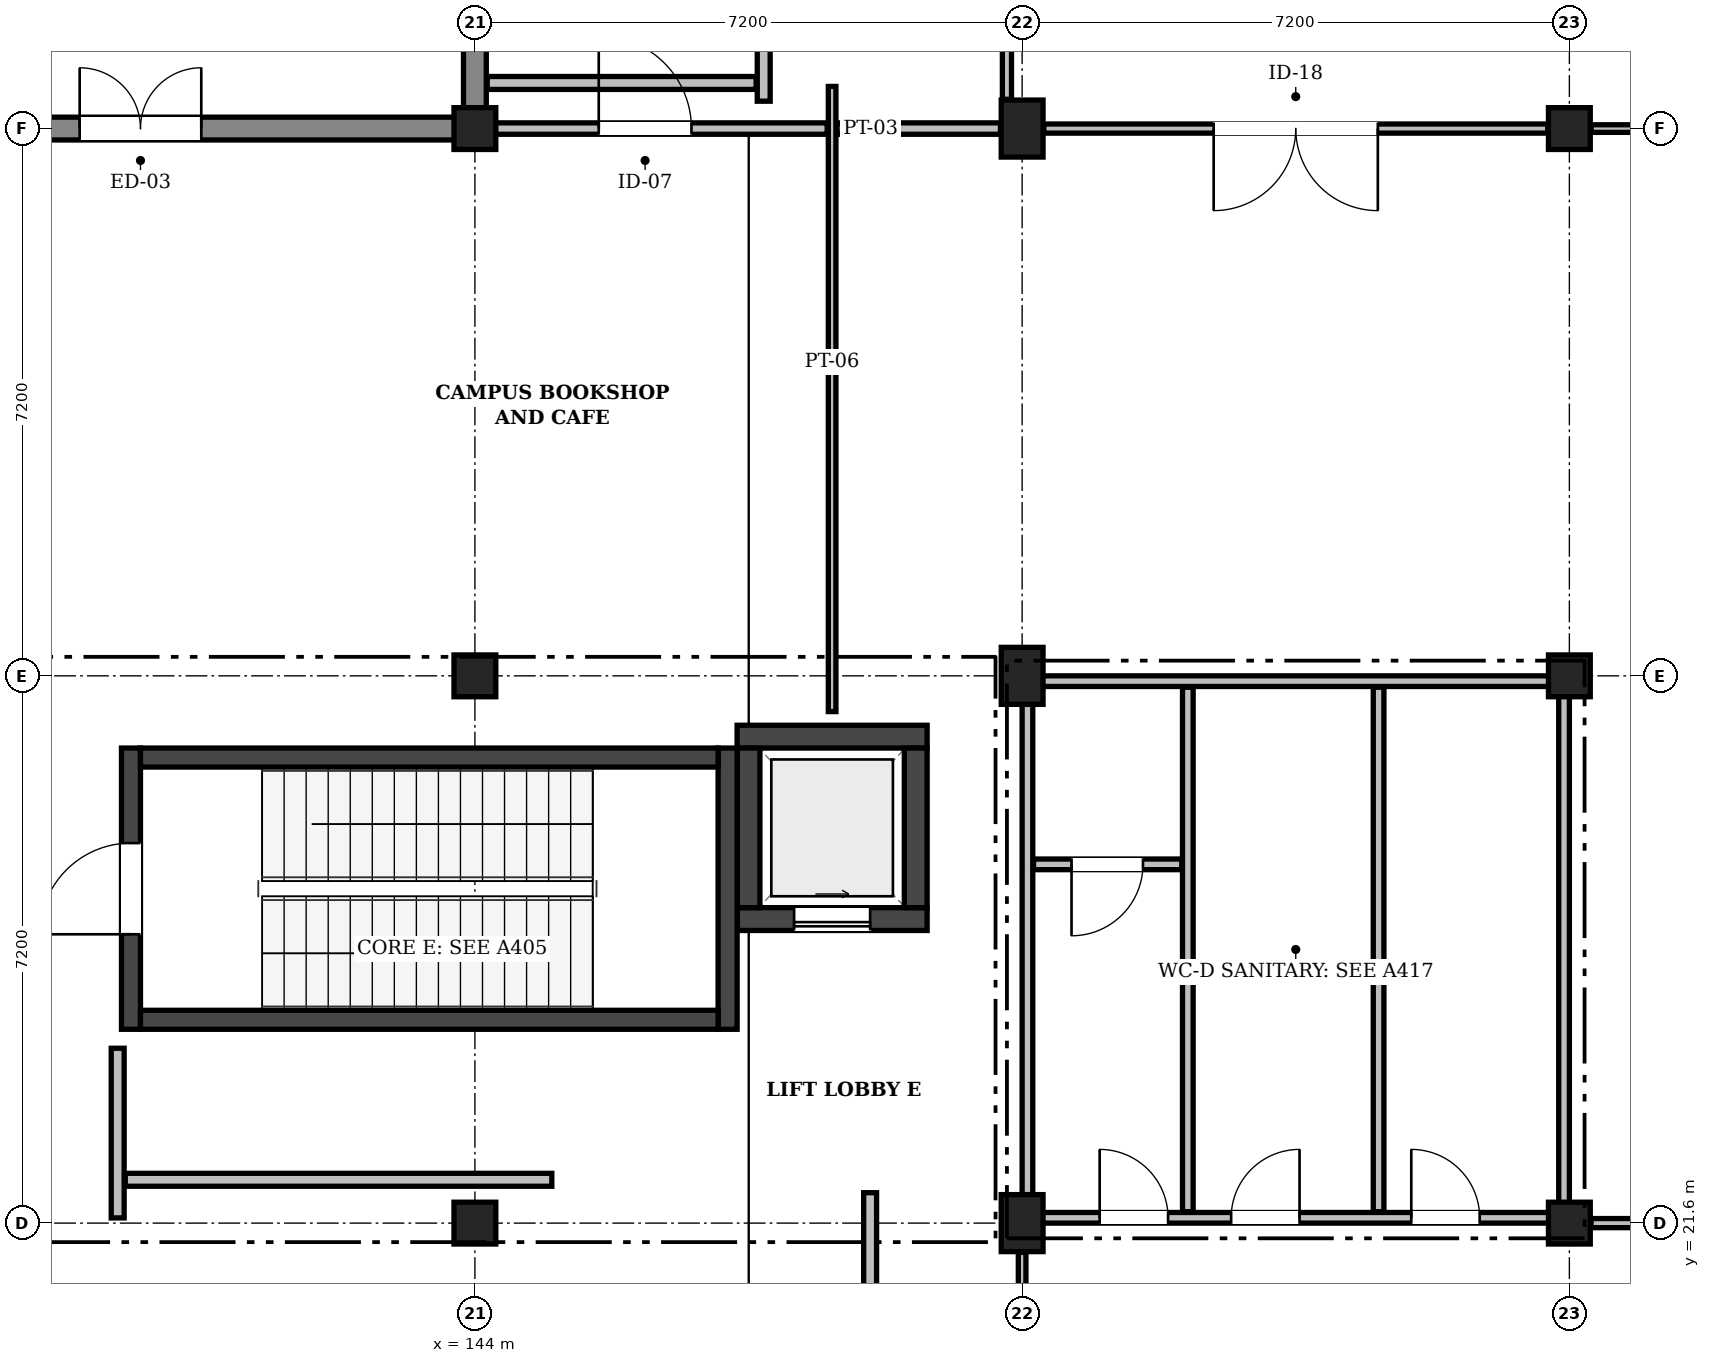
"""IFC4 building model, lengths in metres.
Left out: names, types, materials, properties, quantities, classifications, styles, units other than length and angle.
Written with IfcOpenShell. Run it as: python <this file> out.ifc"""

import sys

from ifc_helpers import new_model, si_unit, direction, frame, frame_2d, origin, origin_2d, place, context, subcontext, project, spatial, rectangle, extrude, element, fill, save


model = new_model("IFC4")
c1 = context("Model", 3, precision=1e-05, world=origin(), true_north=direction((0.0, 1.0)))
c2 = subcontext(c1, "Body", "Model", "MODEL_VIEW")
j1 = project(units=[si_unit("LENGTHUNIT", "METRE"), si_unit("PLANEANGLEUNIT", "RADIAN")], contexts=[c1])
p1 = place(None, origin())
s1 = spatial("IfcSite", under=j1, at=p1, CompositionType="ELEMENT")
p2 = place(p1, origin())
s2 = spatial("IfcBuilding", under=s1, at=p2, CompositionType="ELEMENT")
p3 = place(p2, origin())
s3 = spatial("IfcBuildingStorey", under=s2, at=p3, CompositionType="ELEMENT", Elevation=0.0)
for number, where, z_axis, x_axis in (
    (1, (144.0, 21.6, 0.0), (0.0, 0.0, 1.0), (1.0, 0.0, 0.0)),
    (2, (144.0, 28.8, 0.0), (0.0, 0.0, 1.0), (1.0, 0.0, 0.0)),
    (3, (144.0, 36.0, 0.0), (0.0, 0.0, 1.0), (1.0, 0.0, 0.0)),
):
    element("IfcColumn", number, at=place(p3, frame(where, z_axis=z_axis, x_axis=x_axis)), inside=s3, PredefinedType="COLUMN", context=c2, shape_type="SweptSolid", body=[
        extrude(rectangle(XDim=0.55, YDim=0.55, at=origin_2d()), origin(), (0.0, 0.0, 1.0), 4.8),
    ])
for number, where, z_axis, x_axis in (
    (4, (151.2, 21.6, 0.0), (0.0, 0.0, 1.0), (1.0, 0.0, 0.0)),
    (5, (151.2, 28.8, 0.0), (0.0, 0.0, 1.0), (1.0, 0.0, 0.0)),
    (6, (151.2, 36.0, 0.0), (0.0, 0.0, 1.0), (1.0, 0.0, 0.0)),
):
    element("IfcColumn", number, at=place(p3, frame(where, z_axis=z_axis, x_axis=x_axis)), inside=s3, PredefinedType="COLUMN", context=c2, shape_type="SweptSolid", body=[
        extrude(rectangle(XDim=0.55, YDim=0.75, at=origin_2d()), origin(), (0.0, 0.0, 1.0), 4.8),
    ])
for number, where, z_axis, x_axis in (
    (7, (158.4, 21.6, 0.0), (0.0, 0.0, 1.0), (1.0, 0.0, 0.0)),
    (8, (158.4, 28.8, 0.0), (0.0, 0.0, 1.0), (1.0, 0.0, 0.0)),
    (9, (158.4, 36.0, 0.0), (0.0, 0.0, 1.0), (1.0, 0.0, 0.0)),
):
    element("IfcColumn", number, at=place(p3, frame(where, z_axis=z_axis, x_axis=x_axis)), inside=s3, PredefinedType="COLUMN", context=c2, shape_type="SweptSolid", body=[
        extrude(rectangle(XDim=0.55, YDim=0.55, at=origin_2d()), origin(), (0.0, 0.0, 1.0), 4.8),
    ])
p4 = place(p3, frame((136.8, 36.0, 0.0), z_axis=(0.0, 0.0, 1.0), x_axis=(1.0, 0.0, 0.0)))
e10 = element("IfcWall", 10, at=p4, inside=s3, PredefinedType="SOLIDWALL", context=c2, shape_type="SweptSolid", body=[
    extrude(rectangle(XDim=7.35, YDim=0.3, at=frame_2d((3.675, 0.0))), origin(), (0.0, 0.0, 1.0), 4.52),
])
p5 = place(p4, frame((2.0, 0.0, 0.0)))
e11 = element("IfcOpeningElement", 11, at=p5, cuts=e10, PredefinedType="OPENING", context=c2, shape_type="SweptSolid", body=[
    extrude(rectangle(XDim=1.6, YDim=2.2, at=frame_2d((0.8, 1.1))), frame((0.0, 0.162, 0.0), z_axis=(0.0, -1.0, 0.0), x_axis=(1.0, 0.0, 0.0)), (0.0, 0.0, 1.0), 0.324),
])
p6 = place(p3, frame((144.0, 36.152, 0.0), z_axis=(0.0, 0.0, 1.0), x_axis=(0.0, 1.0, 0.0)))
e12 = element("IfcWall", 12, at=p6, inside=s3, PredefinedType="SOLIDWALL", context=c2, shape_type="SweptSolid", body=[
    extrude(rectangle(XDim=7.048, YDim=0.3, at=frame_2d((3.524, 0.0))), origin(), (0.0, 0.0, 1.0), 4.52),
])
p7 = place(p6, frame((2.888, 0.0, 0.95)))
e13 = element("IfcOpeningElement", 13, at=p7, cuts=e12, PredefinedType="OPENING", context=c2, shape_type="SweptSolid", body=[
    extrude(rectangle(XDim=1.7, YDim=1.55, at=frame_2d((0.85, 0.775))), frame((0.0, 0.162, 0.0), z_axis=(0.0, -1.0, 0.0), x_axis=(1.0, 0.0, 0.0)), (0.0, 0.0, 1.0), 0.324),
])
p8 = place(p3, frame((147.45, 25.6, 0.0), z_axis=(0.0, 0.0, 1.0), x_axis=(1.0, 0.0, 0.0)))
e14 = element("IfcWall", 14, at=p8, inside=s3, PredefinedType="SHEAR", context=c2, shape_type="SweptSolid", body=[
    extrude(rectangle(XDim=2.5, YDim=0.3, at=frame_2d((1.25, 0.0))), origin(), (0.0, 0.0, 1.0), 4.55),
])
p9 = place(p8, frame((0.75, 0.0, 0.0)))
e15 = element("IfcOpeningElement", 15, at=p9, cuts=e14, PredefinedType="OPENING", context=c2, shape_type="SweptSolid", body=[
    extrude(rectangle(XDim=1.0, YDim=2.1, at=frame_2d((0.5, 1.05))), frame((0.0, 0.162, 0.0), z_axis=(0.0, -1.0, 0.0), x_axis=(1.0, 0.0, 0.0)), (0.0, 0.0, 1.0), 0.324),
])
p10 = place(p3, frame((147.45, 28.0, 0.0), z_axis=(0.0, 0.0, 1.0), x_axis=(1.0, 0.0, 0.0)))
e16 = element("IfcWall", 16, at=p10, inside=s3, PredefinedType="SHEAR", context=c2, shape_type="SweptSolid", body=[
    extrude(rectangle(XDim=2.5, YDim=0.3, at=frame_2d((1.25, 0.0))), origin(), (0.0, 0.0, 1.0), 4.55),
])
for number, where, z_axis, x_axis in (
    (17, (147.6, 25.75, 0.0), (0.0, 0.0, 1.0), (0.0, 1.0, 0.0)),
    (18, (149.8, 25.75, 0.0), (0.0, 0.0, 1.0), (0.0, 1.0, 0.0)),
):
    element("IfcWall", number, at=place(p3, frame(where, z_axis=z_axis, x_axis=x_axis)), inside=s3, PredefinedType="SHEAR", context=c2, shape_type="SweptSolid", body=[
        extrude(rectangle(XDim=2.1, YDim=0.3, at=frame_2d((1.05, 0.0))), origin(), (0.0, 0.0, 1.0), 4.55),
    ])
p11 = place(p3, frame((139.475, 24.15, 0.0), z_axis=(0.0, 0.0, 1.0), x_axis=(0.0, 1.0, 0.0)))
e19 = element("IfcWall", 19, at=p11, inside=s3, PredefinedType="SHEAR", context=c2, shape_type="SweptSolid", body=[
    extrude(rectangle(XDim=3.7, YDim=0.25, at=frame_2d((1.85, 0.0))), origin(), (0.0, 0.0, 1.0), 4.55),
])
p12 = place(p11, frame((1.25, 0.0, 0.0)))
e20 = element("IfcOpeningElement", 20, at=p12, cuts=e19, PredefinedType="OPENING", context=c2, shape_type="SweptSolid", body=[
    extrude(rectangle(XDim=1.2, YDim=2.15, at=frame_2d((0.6, 1.075))), frame((0.0, 0.137, 0.0), z_axis=(0.0, -1.0, 0.0), x_axis=(1.0, 0.0, 0.0)), (0.0, 0.0, 1.0), 0.274),
])
p13 = place(p3, frame((147.325, 24.15, 0.0), z_axis=(0.0, 0.0, 1.0), x_axis=(0.0, 1.0, 0.0)))
e21 = element("IfcWall", 21, at=p13, inside=s3, PredefinedType="SHEAR", context=c2, shape_type="SweptSolid", body=[
    extrude(rectangle(XDim=3.7, YDim=0.25, at=frame_2d((1.85, 0.0))), origin(), (0.0, 0.0, 1.0), 4.55),
])
for number, where, z_axis, x_axis in (
    (22, (139.6, 24.275, 0.0), (0.0, 0.0, 1.0), (1.0, 0.0, 0.0)),
    (23, (139.6, 27.725, 0.0), (0.0, 0.0, 1.0), (1.0, 0.0, 0.0)),
):
    element("IfcWall", number, at=place(p3, frame(where, z_axis=z_axis, x_axis=x_axis)), inside=s3, PredefinedType="SHEAR", context=c2, shape_type="SweptSolid", body=[
        extrude(rectangle(XDim=7.6, YDim=0.25, at=frame_2d((3.8, 0.0))), origin(), (0.0, 0.0, 1.0), 4.55),
    ])
p14 = place(p3, frame((151.27, 21.67, 0.0), z_axis=(0.0, 0.0, 1.0), x_axis=(1.0, 0.0, 0.0)))
e24 = element("IfcWall", 24, at=p14, inside=s3, PredefinedType="PARTITIONING", context=c2, shape_type="SweptSolid", body=[
    extrude(rectangle(XDim=7.06, YDim=0.14, at=frame_2d((3.53, 0.0))), origin(), (0.0, 0.0, 1.0), 3.83),
])
p15 = place(p14, frame((0.95, 0.0, 0.0)))
e25 = element("IfcOpeningElement", 25, at=p15, cuts=e24, PredefinedType="OPENING", context=c2, shape_type="SweptSolid", body=[
    extrude(rectangle(XDim=0.9, YDim=2.08, at=frame_2d((0.45, 1.04))), frame((0.0, 0.082, 0.0), z_axis=(0.0, -1.0, 0.0), x_axis=(1.0, 0.0, 0.0)), (0.0, 0.0, 1.0), 0.164),
])
p16 = place(p14, frame((2.68, 0.0, 0.0)))
e26 = element("IfcOpeningElement", 26, at=p16, cuts=e24, PredefinedType="OPENING", context=c2, shape_type="SweptSolid", body=[
    extrude(rectangle(XDim=0.9, YDim=2.08, at=frame_2d((0.45, 1.04))), frame((0.0, 0.082, 0.0), z_axis=(0.0, -1.0, 0.0), x_axis=(1.0, 0.0, 0.0)), (0.0, 0.0, 1.0), 0.164),
])
p17 = place(p14, frame((5.05, 0.0, 0.0)))
e27 = element("IfcOpeningElement", 27, at=p17, cuts=e24, PredefinedType="OPENING", context=c2, shape_type="SweptSolid", body=[
    extrude(rectangle(XDim=0.9, YDim=2.08, at=frame_2d((0.45, 1.04))), frame((0.0, 0.082, 0.0), z_axis=(0.0, -1.0, 0.0), x_axis=(1.0, 0.0, 0.0)), (0.0, 0.0, 1.0), 0.164),
])
p18 = place(p3, frame((151.27, 28.73, 0.0), z_axis=(0.0, 0.0, 1.0), x_axis=(1.0, 0.0, 0.0)))
e28 = element("IfcWall", 28, at=p18, inside=s3, PredefinedType="PARTITIONING", context=c2, shape_type="SweptSolid", body=[
    extrude(rectangle(XDim=7.06, YDim=0.14, at=frame_2d((3.53, 0.0))), origin(), (0.0, 0.0, 1.0), 3.83),
])
for number, where, z_axis, x_axis in (
    (29, (151.27, 21.75, 0.0), (0.0, 0.0, 1.0), (0.0, 1.0, 0.0)),
    (30, (158.33, 21.75, 0.0), (0.0, 0.0, 1.0), (0.0, 1.0, 0.0)),
):
    element("IfcWall", number, at=place(p3, frame(where, z_axis=z_axis, x_axis=x_axis)), inside=s3, PredefinedType="PARTITIONING", context=c2, shape_type="SweptSolid", body=[
        extrude(rectangle(XDim=6.9, YDim=0.14, at=frame_2d((3.45, 0.0))), origin(), (0.0, 0.0, 1.0), 4.08),
    ])
for number, where, z_axis, x_axis in (
    (31, (153.38, 21.75, 0.0), (0.0, 0.0, 1.0), (0.0, 1.0, 0.0)),
    (32, (155.89, 21.75, 0.0), (0.0, 0.0, 1.0), (0.0, 1.0, 0.0)),
):
    element("IfcWall", number, at=place(p3, frame(where, z_axis=z_axis, x_axis=x_axis)), inside=s3, PredefinedType="PARTITIONING", context=c2, shape_type="SweptSolid", body=[
        extrude(rectangle(XDim=6.9, YDim=0.14, at=frame_2d((3.45, 0.0))), origin(), (0.0, 0.0, 1.0), 4.46),
    ])
p19 = place(p3, frame((151.35, 26.32, 0.0), z_axis=(0.0, 0.0, 1.0), x_axis=(1.0, 0.0, 0.0)))
e33 = element("IfcWall", 33, at=p19, inside=s3, PredefinedType="PARTITIONING", context=c2, shape_type="SweptSolid", body=[
    extrude(rectangle(XDim=1.95, YDim=0.14, at=frame_2d((0.975, 0.0))), origin(), (0.0, 0.0, 1.0), 4.46),
])
p20 = place(p19, frame((0.5, 0.0, 0.0)))
e34 = element("IfcOpeningElement", 34, at=p20, cuts=e33, PredefinedType="OPENING", context=c2, shape_type="SweptSolid", body=[
    extrude(rectangle(XDim=0.94, YDim=2.1, at=frame_2d((0.47, 1.05))), frame((0.0, 0.082, 0.0), z_axis=(0.0, -1.0, 0.0), x_axis=(1.0, 0.0, 0.0)), (0.0, 0.0, 1.0), 0.164),
])
p21 = place(p3, frame((139.3, 21.668, 0.0), z_axis=(0.0, 0.0, 1.0), x_axis=(0.0, 1.0, 0.0)))
e35 = element("IfcWall", 35, at=p21, inside=s3, PredefinedType="PARTITIONING", context=c2, shape_type="SweptSolid", body=[
    extrude(rectangle(XDim=2.232, YDim=0.17, at=frame_2d((1.116, 0.0))), origin(), (0.0, 0.0, 1.0), 4.46),
])
p22 = place(p3, frame((147.8, 36.36, 0.0), z_axis=(0.0, 0.0, 1.0), x_axis=(0.0, 1.0, 0.0)))
e36 = element("IfcWall", 36, at=p22, inside=s3, PredefinedType="PARTITIONING", context=c2, shape_type="SweptSolid", body=[
    extrude(rectangle(XDim=9.811, YDim=0.17, at=frame_2d((4.906, 0.0))), origin(), (0.0, 0.0, 1.0), 4.46),
])
p23 = place(p22, frame((4.266, 0.0, 0.0)))
e37 = element("IfcOpeningElement", 37, at=p23, cuts=e36, PredefinedType="OPENING", context=c2, shape_type="SweptSolid", body=[
    extrude(rectangle(XDim=1.28, YDim=2.22, at=frame_2d((0.64, 1.11))), frame((0.0, 0.097, 0.0), z_axis=(0.0, -1.0, 0.0), x_axis=(1.0, 0.0, 0.0)), (0.0, 0.0, 1.0), 0.194),
])
p24 = place(p3, frame((144.162, 36.6, 0.0), z_axis=(0.0, 0.0, 1.0), x_axis=(1.0, 0.0, 0.0)))
e38 = element("IfcWall", 38, at=p24, inside=s3, PredefinedType="PARTITIONING", context=c2, shape_type="SweptSolid", body=[
    extrude(rectangle(XDim=3.538, YDim=0.17, at=frame_2d((1.769, 0.0))), origin(), (0.0, 0.0, 1.0), 4.46),
])
p25 = place(p3, frame((149.2, 17.96, 0.0), z_axis=(0.0, 0.0, 1.0), x_axis=(0.0, 1.0, 0.0)))
e39 = element("IfcWall", 39, at=p25, inside=s3, PredefinedType="PARTITIONING", context=c2, shape_type="SweptSolid", body=[
    extrude(rectangle(XDim=4.04, YDim=0.17, at=frame_2d((2.02, 0.0))), origin(), (0.0, 0.0, 1.0), 4.46),
])
p26 = place(p3, frame((139.4, 22.17, 0.0), z_axis=(0.0, 0.0, 1.0), x_axis=(1.0, 0.0, 0.0)))
e40 = element("IfcWall", 40, at=p26, inside=s3, PredefinedType="PARTITIONING", context=c2, shape_type="SweptSolid", body=[
    extrude(rectangle(XDim=5.612, YDim=0.17, at=frame_2d((2.806, 0.0))), origin(), (0.0, 0.0, 1.0), 4.46),
])
p27 = place(p3, frame((151.2, 14.785, 0.0), z_axis=(0.0, 0.0, 1.0), x_axis=(0.0, 1.0, 0.0)))
e41 = element("IfcWall", 41, at=p27, inside=s3, PredefinedType="PARTITIONING", context=c2, shape_type="SweptSolid", body=[
    extrude(rectangle(XDim=6.43, YDim=0.1, at=frame_2d((3.215, 0.0))), origin(), (0.0, 0.0, 1.0), 4.08),
])
p28 = place(p3, frame((158.685, 21.6, 0.0), z_axis=(0.0, 0.0, 1.0), x_axis=(1.0, 0.0, 0.0)))
e42 = element("IfcWall", 42, at=p28, inside=s3, PredefinedType="PARTITIONING", context=c2, shape_type="SweptSolid", body=[
    extrude(rectangle(XDim=6.753, YDim=0.12, at=frame_2d((3.376, 0.0))), origin(), (0.0, 0.0, 1.0), 3.83),
])
p29 = place(p3, frame((148.7, 28.33, 0.0), z_axis=(0.0, 0.0, 1.0), x_axis=(0.0, 1.0, 0.0)))
e43 = element("IfcWall", 43, at=p29, inside=s3, PredefinedType="PARTITIONING", context=c2, shape_type="SweptSolid", body=[
    extrude(rectangle(XDim=8.224, YDim=0.1, at=frame_2d((4.112, 0.0))), origin(), (0.0, 0.0, 1.0), 4.46),
])
p30 = place(p3, frame((148.765, 36.0, 0.0), z_axis=(0.0, 0.0, 1.0), x_axis=(1.0, 0.0, 0.0)))
e44 = element("IfcWall", 44, at=p30, inside=s3, PredefinedType="PARTITIONING", context=c2, shape_type="SweptSolid", body=[
    extrude(rectangle(XDim=2.15, YDim=0.15, at=frame_2d((1.075, 0.0))), origin(), (0.0, 0.0, 1.0), 3.83),
])
p31 = place(p3, frame((151.485, 36.0, 0.0), z_axis=(0.0, 0.0, 1.0), x_axis=(1.0, 0.0, 0.0)))
e45 = element("IfcWall", 45, at=p31, inside=s3, PredefinedType="PARTITIONING", context=c2, shape_type="SweptSolid", body=[
    extrude(rectangle(XDim=6.63, YDim=0.12, at=frame_2d((3.315, 0.0))), origin(), (0.0, 0.0, 1.0), 3.83),
])
p32 = place(p31, frame((2.235, 0.0, 0.0)))
e46 = element("IfcOpeningElement", 46, at=p32, cuts=e45, PredefinedType="OPENING", context=c2, shape_type="SweptSolid", body=[
    extrude(rectangle(XDim=2.16, YDim=2.35, at=frame_2d((1.08, 1.175))), frame((0.0, 0.072, 0.0), z_axis=(0.0, -1.0, 0.0), x_axis=(1.0, 0.0, 0.0)), (0.0, 0.0, 1.0), 0.144),
])
p33 = place(p3, frame((158.685, 36.0, 0.0), z_axis=(0.0, 0.0, 1.0), x_axis=(1.0, 0.0, 0.0)))
e47 = element("IfcWall", 47, at=p33, inside=s3, PredefinedType="PARTITIONING", context=c2, shape_type="SweptSolid", body=[
    extrude(rectangle(XDim=6.753, YDim=0.1, at=frame_2d((3.376, 0.0))), origin(), (0.0, 0.0, 1.0), 3.83),
])
p34 = place(p3, frame((144.162, 36.0, 0.0), z_axis=(0.0, 0.0, 1.0), x_axis=(1.0, 0.0, 0.0)))
e48 = element("IfcWall", 48, at=p34, inside=s3, PredefinedType="PARTITIONING", context=c2, shape_type="SweptSolid", body=[
    extrude(rectangle(XDim=4.473, YDim=0.15, at=frame_2d((2.236, 0.0))), origin(), (0.0, 0.0, 1.0), 3.83),
])
p35 = place(p34, frame((1.468, 0.0, 0.0)))
e49 = element("IfcOpeningElement", 49, at=p35, cuts=e48, PredefinedType="OPENING", context=c2, shape_type="SweptSolid", body=[
    extrude(rectangle(XDim=1.22, YDim=2.22, at=frame_2d((0.61, 1.11))), frame((0.0, 0.087, 0.0), z_axis=(0.0, -1.0, 0.0), x_axis=(1.0, 0.0, 0.0)), (0.0, 0.0, 1.0), 0.174),
])
p36 = place(p3, frame((151.0, 36.385, 0.0), z_axis=(0.0, 0.0, 1.0), x_axis=(0.0, 1.0, 0.0)))
e50 = element("IfcWall", 50, at=p36, inside=s3, PredefinedType="PARTITIONING", context=c2, shape_type="SweptSolid", body=[
    extrude(rectangle(XDim=6.33, YDim=0.12, at=frame_2d((3.165, 0.0))), origin(), (0.0, 0.0, 1.0), 4.08),
])
p37 = place(p36, frame((2.645, 0.0, 0.0)))
e51 = element("IfcOpeningElement", 51, at=p37, cuts=e50, PredefinedType="OPENING", context=c2, shape_type="SweptSolid", body=[
    extrude(rectangle(XDim=1.04, YDim=2.18, at=frame_2d((0.52, 1.09))), frame((0.0, 0.072, 0.0), z_axis=(0.0, -1.0, 0.0), x_axis=(1.0, 0.0, 0.0)), (0.0, 0.0, 1.0), 0.144),
])
p38 = place(p5, origin())
e52 = element("IfcDoor", 52, at=p38, inside=s3, OperationType="DOUBLE_DOOR_SINGLE_SWING", PredefinedType="DOOR", context=c2, shape_type="SweptSolid", body=[
    extrude(rectangle(XDim=1.6, YDim=2.2, at=frame_2d((0.8, 1.1))), frame((0.0, 0.025, 0.0), z_axis=(0.0, -1.0, 0.0), x_axis=(1.0, 0.0, 0.0)), (0.0, 0.0, 1.0), 0.05),
])
fill(e11, e52)
p39 = place(p9, frame((1.0, 0.0, 0.0), z_axis=(0.0, 0.0, 1.0), x_axis=(-1.0, 0.0, 0.0)))
e53 = element("IfcDoor", 53, at=p39, inside=s3, OperationType="SLIDING_TO_RIGHT", PredefinedType="DOOR", context=c2, shape_type="SweptSolid", body=[
    extrude(rectangle(XDim=1.0, YDim=2.1, at=frame_2d((0.5, 1.05))), frame((0.0, 0.025, 0.0), z_axis=(0.0, -1.0, 0.0), x_axis=(1.0, 0.0, 0.0)), (0.0, 0.0, 1.0), 0.05),
])
fill(e15, e53)
p40 = place(p12, origin())
e54 = element("IfcDoor", 54, at=p40, inside=s3, OperationType="SINGLE_SWING_LEFT", PredefinedType="DOOR", context=c2, shape_type="SweptSolid", body=[
    extrude(rectangle(XDim=1.2, YDim=2.15, at=frame_2d((0.6, 1.075))), frame((0.0, 0.025, 0.0), z_axis=(0.0, -1.0, 0.0), x_axis=(1.0, 0.0, 0.0)), (0.0, 0.0, 1.0), 0.05),
])
fill(e20, e54)
p41 = place(p15, origin())
e55 = element("IfcDoor", 55, at=p41, inside=s3, OperationType="SINGLE_SWING_LEFT", PredefinedType="DOOR", context=c2, shape_type="SweptSolid", body=[
    extrude(rectangle(XDim=0.9, YDim=2.08, at=frame_2d((0.45, 1.04))), frame((0.0, 0.025, 0.0), z_axis=(0.0, -1.0, 0.0), x_axis=(1.0, 0.0, 0.0)), (0.0, 0.0, 1.0), 0.05),
])
fill(e25, e55)
p42 = place(p16, origin())
e56 = element("IfcDoor", 56, at=p42, inside=s3, OperationType="SINGLE_SWING_RIGHT", PredefinedType="DOOR", context=c2, shape_type="SweptSolid", body=[
    extrude(rectangle(XDim=0.9, YDim=2.08, at=frame_2d((0.45, 1.04))), frame((0.0, 0.025, 0.0), z_axis=(0.0, -1.0, 0.0), x_axis=(1.0, 0.0, 0.0)), (0.0, 0.0, 1.0), 0.05),
])
fill(e26, e56)
p43 = place(p17, origin())
e57 = element("IfcDoor", 57, at=p43, inside=s3, OperationType="SINGLE_SWING_LEFT", PredefinedType="DOOR", context=c2, shape_type="SweptSolid", body=[
    extrude(rectangle(XDim=0.9, YDim=2.08, at=frame_2d((0.45, 1.04))), frame((0.0, 0.025, 0.0), z_axis=(0.0, -1.0, 0.0), x_axis=(1.0, 0.0, 0.0)), (0.0, 0.0, 1.0), 0.05),
])
fill(e27, e57)
p44 = place(p20, frame((0.94, 0.0, 0.0), z_axis=(0.0, 0.0, 1.0), x_axis=(-1.0, 0.0, 0.0)))
e58 = element("IfcDoor", 58, at=p44, inside=s3, OperationType="SINGLE_SWING_RIGHT", PredefinedType="DOOR", context=c2, shape_type="SweptSolid", body=[
    extrude(rectangle(XDim=0.94, YDim=2.1, at=frame_2d((0.47, 1.05))), frame((0.0, 0.025, 0.0), z_axis=(0.0, -1.0, 0.0), x_axis=(1.0, 0.0, 0.0)), (0.0, 0.0, 1.0), 0.05),
])
fill(e34, e58)
p45 = place(p35, origin())
e59 = element("IfcDoor", 59, at=p45, inside=s3, OperationType="SINGLE_SWING_LEFT", PredefinedType="DOOR", context=c2, shape_type="SweptSolid", body=[
    extrude(rectangle(XDim=1.22, YDim=2.22, at=frame_2d((0.61, 1.11))), frame((0.0, 0.025, 0.0), z_axis=(0.0, -1.0, 0.0), x_axis=(1.0, 0.0, 0.0)), (0.0, 0.0, 1.0), 0.05),
])
fill(e49, e59)
p46 = place(p32, frame((2.16, 0.0, 0.0), z_axis=(0.0, 0.0, 1.0), x_axis=(-1.0, 0.0, 0.0)))
e60 = element("IfcDoor", 60, at=p46, inside=s3, OperationType="DOUBLE_DOOR_SINGLE_SWING", PredefinedType="DOOR", context=c2, shape_type="SweptSolid", body=[
    extrude(rectangle(XDim=2.16, YDim=2.35, at=frame_2d((1.08, 1.175))), frame((0.0, 0.025, 0.0), z_axis=(0.0, -1.0, 0.0), x_axis=(1.0, 0.0, 0.0)), (0.0, 0.0, 1.0), 0.05),
])
fill(e46, e60)
save(model, sys.argv[1])
